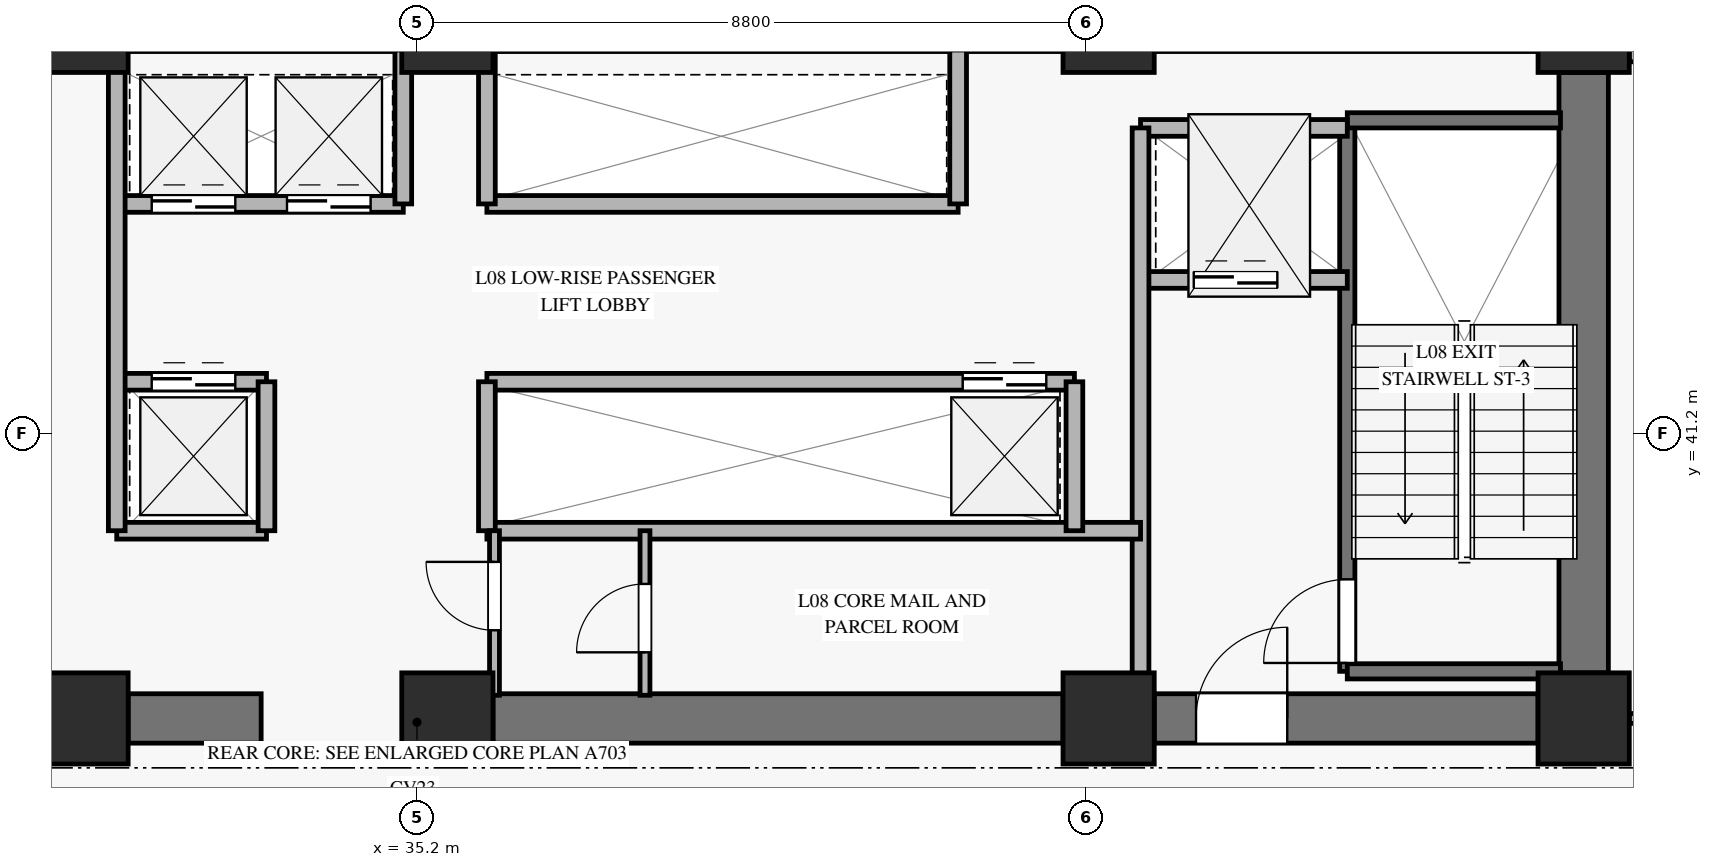
"""IFC4 building model, lengths in metres.
Left out: names, types, materials, properties, quantities, classifications, styles, units other than length and angle.
Written with IfcOpenShell. Run it as: python <this file> out.ifc"""

import sys

from ifc_helpers import new_model, si_unit, direction, frame, frame_2d, origin, origin_2d, place, context, subcontext, project, spatial, rectangle, extrude, source, transform, mapped, element, fill, save


model = new_model("IFC4")
c1 = context("Model", 3, precision=1e-05, world=origin(), true_north=direction((0.0, 1.0)))
c2 = subcontext(c1, "Body", "Model", "MODEL_VIEW")
j1 = project(units=[si_unit("LENGTHUNIT", "METRE"), si_unit("PLANEANGLEUNIT", "RADIAN")], contexts=[c1])
p1 = place(None, origin())
s1 = spatial("IfcSite", under=j1, at=p1, CompositionType="ELEMENT")
p2 = place(p1, origin())
s2 = spatial("IfcBuilding", under=s1, at=p2, CompositionType="ELEMENT")
p3 = place(p2, frame((0.0, 0.0, 33.2)))
s3 = spatial("IfcBuildingStorey", under=s2, at=p3, CompositionType="ELEMENT", Elevation=33.2)
m1 = source(origin(), c2, "Body", "SweptSolid", [
    extrude(rectangle(XDim=1.2, YDim=1.2, at=origin_2d()), origin(), (0.0, 0.0, 1.0), 3.68),
])
for number, where, z_axis, x_axis in (
    (1, (30.8, 37.45, 0.0), (0.0, 0.0, 1.0), (1.0, 0.0, 0.0)),
    (2, (30.8, 46.55, 0.0), (0.0, 0.0, 1.0), (1.0, 0.0, 0.0)),
    (3, (35.6, 37.45, 0.0), (0.0, 0.0, 1.0), (1.0, 0.0, 0.0)),
    (4, (35.6, 46.55, 0.0), (0.0, 0.0, 1.0), (1.0, 0.0, 0.0)),
    (5, (44.3, 37.45, 0.0), (0.0, 0.0, 1.0), (1.0, 0.0, 0.0)),
    (6, (44.3, 46.55, 0.0), (0.0, 0.0, 1.0), (1.0, 0.0, 0.0)),
    (7, (50.55, 37.45, 0.0), (0.0, 0.0, 1.0), (1.0, 0.0, 0.0)),
    (8, (50.55, 46.55, 0.0), (0.0, 0.0, 1.0), (1.0, 0.0, 0.0)),
):
    element("IfcColumn", number, at=place(p3, frame(where, z_axis=z_axis, x_axis=x_axis)), inside=s3, PredefinedType="PILASTER", context=c2, shape_type="MappedRepresentation", body=[
        mapped(m1, transform((0.0, 0.0, 0.0), x_axis=(1.0, 0.0, 0.0), y_axis=(0.0, 1.0, 0.0), z_axis=(0.0, 0.0, 1.0), scale=1.0)),
    ])
p4 = place(p3, frame((31.4, 37.45, 0.0), z_axis=(0.0, 0.0, 1.0), x_axis=(1.0, 0.0, 0.0)))
e9 = element("IfcWall", 9, at=p4, inside=s3, PredefinedType="SHEAR", context=c2, shape_type="SweptSolid", body=[
    extrude(rectangle(XDim=1.75, YDim=0.65, at=frame_2d((0.875, 0.0))), origin(), (0.0, 0.0, 1.0), 3.68),
])
p5 = place(p3, frame((36.2, 37.45, 0.0), z_axis=(0.0, 0.0, 1.0), x_axis=(1.0, 0.0, 0.0)))
e10 = element("IfcWall", 10, at=p5, inside=s3, PredefinedType="SHEAR", context=c2, shape_type="SweptSolid", body=[
    extrude(rectangle(XDim=7.5, YDim=0.65, at=frame_2d((3.75, 0.0))), origin(), (0.0, 0.0, 1.0), 3.68),
])
p6 = place(p3, frame((44.9, 37.45, 0.0), z_axis=(0.0, 0.0, 1.0), x_axis=(1.0, 0.0, 0.0)))
e11 = element("IfcWall", 11, at=p6, inside=s3, PredefinedType="SHEAR", context=c2, shape_type="SweptSolid", body=[
    extrude(rectangle(XDim=5.05, YDim=0.65, at=frame_2d((2.525, 0.0))), origin(), (0.0, 0.0, 1.0), 3.68),
])
p7 = place(p6, frame((0.55, 0.0, 0.0)))
e12 = element("IfcOpeningElement", 12, at=p7, cuts=e11, PredefinedType="OPENING", context=c2, shape_type="SweptSolid", body=[
    extrude(rectangle(XDim=1.2, YDim=2.15, at=frame_2d((0.6, 1.075))), frame((0.0, 0.335, 0.0), z_axis=(0.0, -1.0, 0.0), x_axis=(1.0, 0.0, 0.0)), (0.0, 0.0, 1.0), 0.67),
])
p8 = place(p3, frame((50.55, 38.05, 0.0), z_axis=(0.0, 0.0, 1.0), x_axis=(0.0, 1.0, 0.0)))
e13 = element("IfcWall", 13, at=p8, inside=s3, PredefinedType="SHEAR", context=c2, shape_type="SweptSolid", body=[
    extrude(rectangle(XDim=7.9, YDim=0.65, at=frame_2d((3.95, 0.0))), origin(), (0.0, 0.0, 1.0), 3.68),
])
p9 = place(p3, frame((51.15, 46.25, 0.0), z_axis=(0.0, 0.0, 1.0), x_axis=(1.0, 0.0, 0.0)))
e14 = element("IfcWall", 14, at=p9, inside=s3, PredefinedType="SOLIDWALL", context=c2, shape_type="SweptSolid", body=[
    extrude(rectangle(XDim=12.4, YDim=0.32, at=frame_2d((6.2, 0.0))), origin(), (0.0, 0.0, 1.0), 3.16),
])
p10 = place(p9, frame((5.4, 0.0, 0.45)))
e15 = element("IfcOpeningElement", 15, at=p10, cuts=e14, PredefinedType="OPENING", context=c2, shape_type="SweptSolid", body=[
    extrude(rectangle(XDim=1.6, YDim=2.0, at=frame_2d((0.8, 1.0))), frame((0.0, 0.17, 0.0), z_axis=(0.0, -1.0, 0.0), x_axis=(1.0, 0.0, 0.0)), (0.0, 0.0, 1.0), 0.34),
])
p11 = place(p3, frame((47.44, 38.07, 0.0), z_axis=(0.0, 0.0, 1.0), x_axis=(0.0, 1.0, 0.0)))
e16 = element("IfcWall", 16, at=p11, inside=s3, PredefinedType="SOLIDWALL", context=c2, shape_type="SweptSolid", body=[
    extrude(rectangle(XDim=7.25, YDim=0.2, at=frame_2d((3.625, 0.0))), origin(), (0.0, 0.0, 1.0), 3.9),
])
p12 = place(p11, frame((0.11, 0.0, 0.0)))
e17 = element("IfcOpeningElement", 17, at=p12, cuts=e16, PredefinedType="OPENING", context=c2, shape_type="SweptSolid", body=[
    extrude(rectangle(XDim=1.1, YDim=2.15, at=frame_2d((0.55, 1.075))), frame((0.0, 0.11, 0.0), z_axis=(0.0, -1.0, 0.0), x_axis=(1.0, 0.0, 0.0)), (0.0, 0.0, 1.0), 0.22),
])
for number, where, z_axis, x_axis in (
    (18, (47.44, 45.32, 0.0), (0.0, 0.0, 1.0), (1.0, 0.0, 0.0)),
    (19, (47.44, 38.07, 0.0), (0.0, 0.0, 1.0), (1.0, 0.0, 0.0)),
):
    element("IfcWall", number, at=place(p3, frame(where, z_axis=z_axis, x_axis=x_axis)), inside=s3, PredefinedType="SOLIDWALL", context=c2, shape_type="SweptSolid", body=[
        extrude(rectangle(XDim=2.805, YDim=0.2, at=frame_2d((1.403, 0.0))), origin(), (0.0, 0.0, 1.0), 3.9),
    ])
p13 = place(p3, frame((44.72, 43.22, 0.0), z_axis=(0.0, 0.0, 1.0), x_axis=(1.0, 0.0, 0.0)))
e20 = element("IfcWall", 20, at=p13, inside=s3, PredefinedType="SOLIDWALL", context=c2, shape_type="SweptSolid", body=[
    extrude(rectangle(XDim=2.72, YDim=0.22, at=frame_2d((1.36, 0.0))), origin(), (0.0, 0.0, 1.0), 3.68),
])
p14 = place(p13, frame((0.7, 0.0, 0.0)))
e21 = element("IfcOpeningElement", 21, at=p14, cuts=e20, PredefinedType="OPENING", context=c2, shape_type="SweptSolid", body=[
    extrude(rectangle(XDim=1.1, YDim=2.2, at=frame_2d((0.55, 1.1))), frame((0.0, 0.12, 0.0), z_axis=(0.0, -1.0, 0.0), x_axis=(1.0, 0.0, 0.0)), (0.0, 0.0, 1.0), 0.24),
])
p15 = place(p3, frame((44.72, 45.22, 0.0), z_axis=(0.0, 0.0, 1.0), x_axis=(1.0, 0.0, 0.0)))
e22 = element("IfcWall", 22, at=p15, inside=s3, PredefinedType="SOLIDWALL", context=c2, shape_type="SweptSolid", body=[
    extrude(rectangle(XDim=2.72, YDim=0.22, at=frame_2d((1.36, 0.0))), origin(), (0.0, 0.0, 1.0), 3.68),
])
p16 = place(p3, frame((44.72, 37.755, 0.0), z_axis=(0.0, 0.0, 1.0), x_axis=(0.0, 1.0, 0.0)))
e23 = element("IfcWall", 23, at=p16, inside=s3, PredefinedType="SOLIDWALL", context=c2, shape_type="SweptSolid", body=[
    extrude(rectangle(XDim=7.465, YDim=0.22, at=frame_2d((3.732, 0.0))), origin(), (0.0, 0.0, 1.0), 3.68),
])
p17 = place(p3, frame((31.25, 44.22, 0.0), z_axis=(0.0, 0.0, 1.0), x_axis=(1.0, 0.0, 0.0)))
e24 = element("IfcWall", 24, at=p17, inside=s3, PredefinedType="SOLIDWALL", context=c2, shape_type="SweptSolid", body=[
    extrude(rectangle(XDim=3.77, YDim=0.22, at=frame_2d((1.885, 0.0))), origin(), (0.0, 0.0, 1.0), 3.68),
])
p18 = place(p17, frame((0.46, 0.0, 0.0)))
e25 = element("IfcOpeningElement", 25, at=p18, cuts=e24, PredefinedType="OPENING", context=c2, shape_type="SweptSolid", body=[
    extrude(rectangle(XDim=1.1, YDim=2.2, at=frame_2d((0.55, 1.1))), frame((0.0, 0.12, 0.0), z_axis=(0.0, -1.0, 0.0), x_axis=(1.0, 0.0, 0.0)), (0.0, 0.0, 1.0), 0.24),
])
p19 = place(p17, frame((2.24, 0.0, 0.0)))
e26 = element("IfcOpeningElement", 26, at=p19, cuts=e24, PredefinedType="OPENING", context=c2, shape_type="SweptSolid", body=[
    extrude(rectangle(XDim=1.1, YDim=2.2, at=frame_2d((0.55, 1.1))), frame((0.0, 0.12, 0.0), z_axis=(0.0, -1.0, 0.0), x_axis=(1.0, 0.0, 0.0)), (0.0, 0.0, 1.0), 0.24),
])
p20 = place(p3, frame((36.12, 44.22, 0.0), z_axis=(0.0, 0.0, 1.0), x_axis=(1.0, 0.0, 0.0)))
e27 = element("IfcWall", 27, at=p20, inside=s3, PredefinedType="SOLIDWALL", context=c2, shape_type="SweptSolid", body=[
    extrude(rectangle(XDim=6.2, YDim=0.22, at=frame_2d((3.1, 0.0))), origin(), (0.0, 0.0, 1.0), 3.68),
])
for number, where, z_axis, x_axis in (
    (28, (35.02, 44.22, 0.0), (0.0, 0.0, 1.0), (0.0, 1.0, 0.0)),
    (29, (36.12, 44.22, 0.0), (0.0, 0.0, 1.0), (0.0, 1.0, 0.0)),
    (30, (42.32, 44.22, 0.0), (0.0, 0.0, 1.0), (0.0, 1.0, 0.0)),
):
    element("IfcWall", number, at=place(p3, frame(where, z_axis=z_axis, x_axis=x_axis)), inside=s3, PredefinedType="SOLIDWALL", context=c2, shape_type="SweptSolid", body=[
        extrude(rectangle(XDim=2.025, YDim=0.22, at=frame_2d((1.013, 0.0))), origin(), (0.0, 0.0, 1.0), 3.68),
    ])
p21 = place(p3, frame((31.25, 41.88, 0.0), z_axis=(0.0, 0.0, 1.0), x_axis=(1.0, 0.0, 0.0)))
e31 = element("IfcWall", 31, at=p21, inside=s3, PredefinedType="SOLIDWALL", context=c2, shape_type="SweptSolid", body=[
    extrude(rectangle(XDim=1.97, YDim=0.22, at=frame_2d((0.985, 0.0))), origin(), (0.0, 0.0, 1.0), 3.68),
])
p22 = place(p21, frame((0.46, 0.0, 0.0)))
e32 = element("IfcOpeningElement", 32, at=p22, cuts=e31, PredefinedType="OPENING", context=c2, shape_type="SweptSolid", body=[
    extrude(rectangle(XDim=1.1, YDim=2.2, at=frame_2d((0.55, 1.1))), frame((0.0, 0.12, 0.0), z_axis=(0.0, -1.0, 0.0), x_axis=(1.0, 0.0, 0.0)), (0.0, 0.0, 1.0), 0.24),
])
p23 = place(p3, frame((36.12, 41.88, 0.0), z_axis=(0.0, 0.0, 1.0), x_axis=(1.0, 0.0, 0.0)))
e33 = element("IfcWall", 33, at=p23, inside=s3, PredefinedType="SOLIDWALL", context=c2, shape_type="SweptSolid", body=[
    extrude(rectangle(XDim=7.73, YDim=0.22, at=frame_2d((3.865, 0.0))), origin(), (0.0, 0.0, 1.0), 3.68),
])
p24 = place(p23, frame((6.26, 0.0, 0.0)))
e34 = element("IfcOpeningElement", 34, at=p24, cuts=e33, PredefinedType="OPENING", context=c2, shape_type="SweptSolid", body=[
    extrude(rectangle(XDim=1.1, YDim=2.2, at=frame_2d((0.55, 1.1))), frame((0.0, 0.12, 0.0), z_axis=(0.0, -1.0, 0.0), x_axis=(1.0, 0.0, 0.0)), (0.0, 0.0, 1.0), 0.24),
])
p25 = place(p3, frame((31.25, 39.92, 0.0), z_axis=(0.0, 0.0, 1.0), x_axis=(1.0, 0.0, 0.0)))
e35 = element("IfcWall", 35, at=p25, inside=s3, PredefinedType="SOLIDWALL", context=c2, shape_type="SweptSolid", body=[
    extrude(rectangle(XDim=1.97, YDim=0.22, at=frame_2d((0.985, 0.0))), origin(), (0.0, 0.0, 1.0), 3.68),
])
p26 = place(p3, frame((33.22, 39.92, 0.0), z_axis=(0.0, 0.0, 1.0), x_axis=(0.0, 1.0, 0.0)))
e36 = element("IfcWall", 36, at=p26, inside=s3, PredefinedType="SOLIDWALL", context=c2, shape_type="SweptSolid", body=[
    extrude(rectangle(XDim=1.96, YDim=0.22, at=frame_2d((0.98, 0.0))), origin(), (0.0, 0.0, 1.0), 3.68),
])
p27 = place(p3, frame((36.12, 39.92, 0.0), z_axis=(0.0, 0.0, 1.0), x_axis=(1.0, 0.0, 0.0)))
e37 = element("IfcWall", 37, at=p27, inside=s3, PredefinedType="SOLIDWALL", context=c2, shape_type="SweptSolid", body=[
    extrude(rectangle(XDim=8.6, YDim=0.22, at=frame_2d((4.3, 0.0))), origin(), (0.0, 0.0, 1.0), 2.965),
])
p28 = place(p3, frame((36.12, 39.92, 0.0), z_axis=(0.0, 0.0, 1.0), x_axis=(0.0, 1.0, 0.0)))
e38 = element("IfcWall", 38, at=p28, inside=s3, PredefinedType="SOLIDWALL", context=c2, shape_type="SweptSolid", body=[
    extrude(rectangle(XDim=1.96, YDim=0.22, at=frame_2d((0.98, 0.0))), origin(), (0.0, 0.0, 1.0), 3.68),
])
p29 = place(p3, frame((31.25, 39.92, 0.0), z_axis=(0.0, 0.0, 1.0), x_axis=(0.0, 1.0, 0.0)))
e39 = element("IfcWall", 39, at=p29, inside=s3, PredefinedType="SOLIDWALL", context=c2, shape_type="SweptSolid", body=[
    extrude(rectangle(XDim=6.325, YDim=0.22, at=frame_2d((3.163, 0.0))), origin(), (0.0, 0.0, 1.0), 3.68),
])
p30 = place(p3, frame((43.85, 39.92, 0.0), z_axis=(0.0, 0.0, 1.0), x_axis=(0.0, 1.0, 0.0)))
e40 = element("IfcWall", 40, at=p30, inside=s3, PredefinedType="SOLIDWALL", context=c2, shape_type="SweptSolid", body=[
    extrude(rectangle(XDim=1.96, YDim=0.22, at=frame_2d((0.98, 0.0))), origin(), (0.0, 0.0, 1.0), 3.68),
])
p31 = place(p3, frame((36.22, 37.755, 0.0), z_axis=(0.0, 0.0, 1.0), x_axis=(0.0, 1.0, 0.0)))
e41 = element("IfcWall", 41, at=p31, inside=s3, PredefinedType="PARTITIONING", context=c2, shape_type="SweptSolid", body=[
    extrude(rectangle(XDim=2.165, YDim=0.13, at=frame_2d((1.083, 0.0))), origin(), (0.0, 0.0, 1.0), 3.68),
])
p32 = place(p31, frame((0.855, 0.0, 0.0)))
e42 = element("IfcOpeningElement", 42, at=p32, cuts=e41, PredefinedType="OPENING", context=c2, shape_type="SweptSolid", body=[
    extrude(rectangle(XDim=0.9, YDim=2.1, at=frame_2d((0.45, 1.05))), frame((0.0, 0.075, 0.0), z_axis=(0.0, -1.0, 0.0), x_axis=(1.0, 0.0, 0.0)), (0.0, 0.0, 1.0), 0.15),
])
p33 = place(p3, frame((38.2, 37.755, 0.0), z_axis=(0.0, 0.0, 1.0), x_axis=(0.0, 1.0, 0.0)))
e43 = element("IfcWall", 43, at=p33, inside=s3, PredefinedType="PARTITIONING", context=c2, shape_type="SweptSolid", body=[
    extrude(rectangle(XDim=2.165, YDim=0.13, at=frame_2d((1.083, 0.0))), origin(), (0.0, 0.0, 1.0), 3.68),
])
p34 = place(p33, frame((0.565, 0.0, 0.0)))
e44 = element("IfcOpeningElement", 44, at=p34, cuts=e43, PredefinedType="OPENING", context=c2, shape_type="SweptSolid", body=[
    extrude(rectangle(XDim=0.9, YDim=2.1, at=frame_2d((0.45, 1.05))), frame((0.0, 0.075, 0.0), z_axis=(0.0, -1.0, 0.0), x_axis=(1.0, 0.0, 0.0)), (0.0, 0.0, 1.0), 0.15),
])
p35 = place(p3, frame((51.15, 37.45, 0.0), z_axis=(0.0, 0.0, 1.0), x_axis=(1.0, 0.0, 0.0)))
e45 = element("IfcWall", 45, at=p35, inside=s3, PredefinedType="PARTITIONING", context=c2, shape_type="SweptSolid", body=[
    extrude(rectangle(XDim=16.15, YDim=0.13, at=frame_2d((8.075, 0.0))), origin(), (0.0, 0.0, 1.0), 3.165),
])
p36 = place(p35, frame((0.5, 0.0, 0.0)))
e46 = element("IfcOpeningElement", 46, at=p36, cuts=e45, PredefinedType="OPENING", context=c2, shape_type="SweptSolid", body=[
    extrude(rectangle(XDim=0.9, YDim=2.1, at=frame_2d((0.45, 1.05))), frame((0.0, 0.075, 0.0), z_axis=(0.0, -1.0, 0.0), x_axis=(1.0, 0.0, 0.0)), (0.0, 0.0, 1.0), 0.15),
])
p37 = place(p35, frame((11.58, 0.0, 0.0)))
e47 = element("IfcOpeningElement", 47, at=p37, cuts=e45, PredefinedType="OPENING", context=c2, shape_type="SweptSolid", body=[
    extrude(rectangle(XDim=0.95, YDim=2.1, at=frame_2d((0.475, 1.05))), frame((0.0, 0.075, 0.0), z_axis=(0.0, -1.0, 0.0), x_axis=(1.0, 0.0, 0.0)), (0.0, 0.0, 1.0), 0.15),
])
m2 = source(origin(), c2, "Body", "SweptSolid", [
    extrude(rectangle(XDim=1.1, YDim=2.15, at=frame_2d((0.55, 1.075))), frame((0.0, 0.025, 0.0), z_axis=(0.0, -1.0, 0.0), x_axis=(1.0, 0.0, 0.0)), (0.0, 0.0, 1.0), 0.05),
])
p38 = place(p12, origin())
e48 = element("IfcDoor", 48, at=p38, inside=s3, OperationType="SINGLE_SWING_LEFT", PredefinedType="DOOR", context=c2, shape_type="MappedRepresentation", body=[
    mapped(m2, transform((0.0, 0.0, 0.0), x_axis=(1.0, 0.0, 0.0), y_axis=(0.0, 1.0, 0.0), z_axis=(0.0, 0.0, 1.0), scale=1.0)),
])
fill(e17, e48)
m3 = source(origin(), c2, "Body", "SweptSolid", [
    extrude(rectangle(XDim=1.1, YDim=2.2, at=frame_2d((0.55, 1.1))), frame((0.0, 0.025, 0.0), z_axis=(0.0, -1.0, 0.0), x_axis=(1.0, 0.0, 0.0)), (0.0, 0.0, 1.0), 0.05),
])
p39 = place(p14, origin())
e49 = element("IfcDoor", 49, at=p39, inside=s3, OperationType="SLIDING_TO_LEFT", PredefinedType="DOOR", context=c2, shape_type="MappedRepresentation", body=[
    mapped(m3, transform((0.0, 0.0, 0.0), x_axis=(1.0, 0.0, 0.0), y_axis=(0.0, 1.0, 0.0), z_axis=(0.0, 0.0, 1.0), scale=1.0)),
])
fill(e21, e49)
m4 = source(origin(), c2, "Body", "SweptSolid", [
    extrude(rectangle(XDim=1.2, YDim=2.15, at=frame_2d((0.6, 1.075))), frame((0.0, 0.025, 0.0), z_axis=(0.0, -1.0, 0.0), x_axis=(1.0, 0.0, 0.0)), (0.0, 0.0, 1.0), 0.05),
])
p40 = place(p7, origin())
e50 = element("IfcDoor", 50, at=p40, inside=s3, OperationType="SINGLE_SWING_RIGHT", PredefinedType="DOOR", context=c2, shape_type="MappedRepresentation", body=[
    mapped(m4, transform((0.0, 0.0, 0.0), x_axis=(1.0, 0.0, 0.0), y_axis=(0.0, 1.0, 0.0), z_axis=(0.0, 0.0, 1.0), scale=1.0)),
])
fill(e12, e50)
p41 = place(p18, origin())
e51 = element("IfcDoor", 51, at=p41, inside=s3, OperationType="SLIDING_TO_LEFT", PredefinedType="DOOR", context=c2, shape_type="MappedRepresentation", body=[
    mapped(m3, transform((0.0, 0.0, 0.0), x_axis=(1.0, 0.0, 0.0), y_axis=(0.0, 1.0, 0.0), z_axis=(0.0, 0.0, 1.0), scale=1.0)),
])
fill(e25, e51)
p42 = place(p19, origin())
e52 = element("IfcDoor", 52, at=p42, inside=s3, OperationType="SLIDING_TO_LEFT", PredefinedType="DOOR", context=c2, shape_type="MappedRepresentation", body=[
    mapped(m3, transform((0.0, 0.0, 0.0), x_axis=(1.0, 0.0, 0.0), y_axis=(0.0, 1.0, 0.0), z_axis=(0.0, 0.0, 1.0), scale=1.0)),
])
fill(e26, e52)
p43 = place(p22, origin())
e53 = element("IfcDoor", 53, at=p43, inside=s3, OperationType="SLIDING_TO_LEFT", PredefinedType="DOOR", context=c2, shape_type="MappedRepresentation", body=[
    mapped(m3, transform((0.0, 0.0, 0.0), x_axis=(1.0, 0.0, 0.0), y_axis=(0.0, 1.0, 0.0), z_axis=(0.0, 0.0, 1.0), scale=1.0)),
])
fill(e32, e53)
p44 = place(p24, origin())
e54 = element("IfcDoor", 54, at=p44, inside=s3, OperationType="SLIDING_TO_LEFT", PredefinedType="DOOR", context=c2, shape_type="MappedRepresentation", body=[
    mapped(m3, transform((0.0, 0.0, 0.0), x_axis=(1.0, 0.0, 0.0), y_axis=(0.0, 1.0, 0.0), z_axis=(0.0, 0.0, 1.0), scale=1.0)),
])
fill(e34, e54)
m5 = source(origin(), c2, "Body", "SweptSolid", [
    extrude(rectangle(XDim=0.9, YDim=2.1, at=frame_2d((0.45, 1.05))), frame((0.0, 0.025, 0.0), z_axis=(0.0, -1.0, 0.0), x_axis=(1.0, 0.0, 0.0)), (0.0, 0.0, 1.0), 0.05),
])
p45 = place(p32, origin())
e55 = element("IfcDoor", 55, at=p45, inside=s3, OperationType="SINGLE_SWING_RIGHT", PredefinedType="DOOR", context=c2, shape_type="MappedRepresentation", body=[
    mapped(m5, transform((0.0, 0.0, 0.0), x_axis=(1.0, 0.0, 0.0), y_axis=(0.0, 1.0, 0.0), z_axis=(0.0, 0.0, 1.0), scale=1.0)),
])
fill(e42, e55)
p46 = place(p34, origin())
e56 = element("IfcDoor", 56, at=p46, inside=s3, OperationType="SINGLE_SWING_LEFT", PredefinedType="DOOR", context=c2, shape_type="MappedRepresentation", body=[
    mapped(m5, transform((0.0, 0.0, 0.0), x_axis=(1.0, 0.0, 0.0), y_axis=(0.0, 1.0, 0.0), z_axis=(0.0, 0.0, 1.0), scale=1.0)),
])
fill(e44, e56)
save(model, sys.argv[1])
